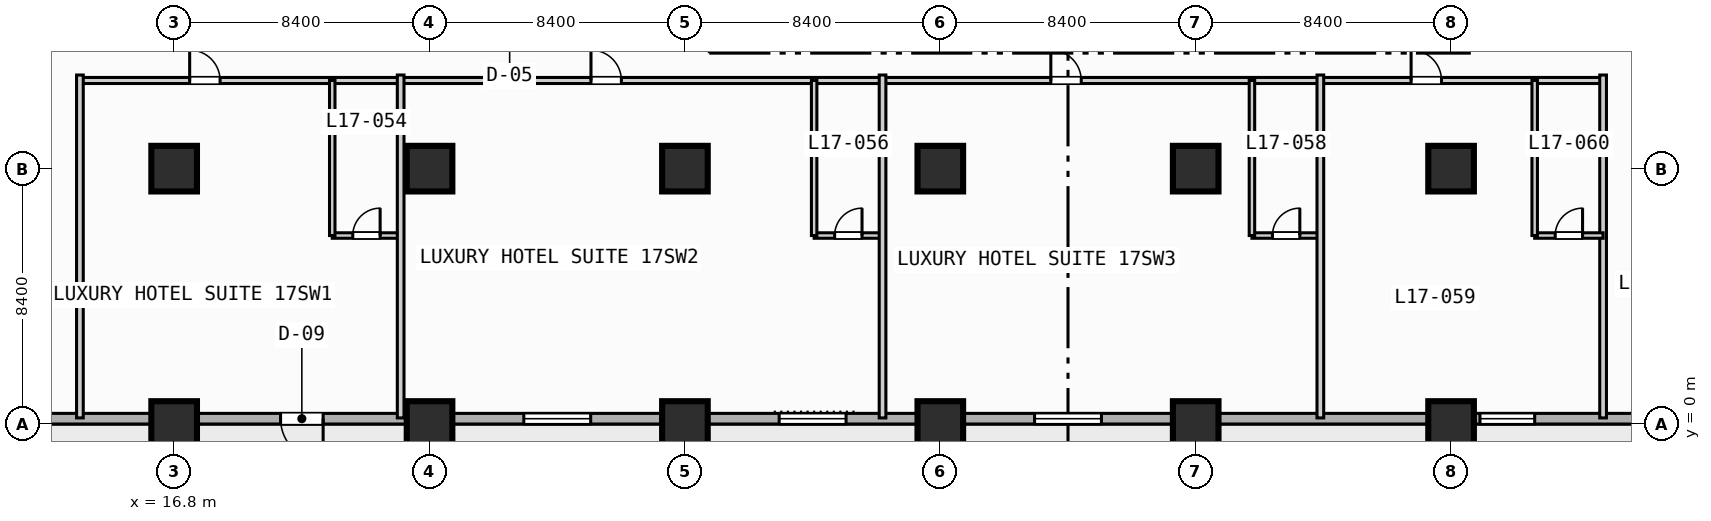
"""IFC4 building model, lengths in metres.
Left out: names, types, materials, properties, quantities, classifications, styles, units other than length and angle.
Written with IfcOpenShell. Run it as: python <this file> out.ifc"""

import sys

from ifc_helpers import new_model, si_unit, direction, frame, frame_2d, origin, origin_2d, place, context, subcontext, project, spatial, rectangle, extrude, element, fill, save


model = new_model("IFC4")
c1 = context("Model", 3, precision=1e-05, world=origin(), true_north=direction((0.0, 1.0)))
c2 = subcontext(c1, "Body", "Model", "MODEL_VIEW")
j1 = project(units=[si_unit("LENGTHUNIT", "METRE"), si_unit("PLANEANGLEUNIT", "RADIAN")], contexts=[c1])
p1 = place(None, origin())
s1 = spatial("IfcSite", under=j1, at=p1, CompositionType="ELEMENT")
p2 = place(p1, origin())
s2 = spatial("IfcBuilding", under=s1, at=p2, CompositionType="ELEMENT")
p3 = place(p2, frame((0.0, 0.0, 73.8)))
s3 = spatial("IfcBuildingStorey", under=s2, at=p3, CompositionType="ELEMENT", Elevation=73.8)
for number, where, z_axis, x_axis in (
    (1, (16.8, 0.0, 0.0), (0.0, 0.0, 1.0), (1.0, 0.0, 0.0)),
    (2, (16.8, 8.4, 0.0), (0.0, 0.0, 1.0), (1.0, 0.0, 0.0)),
    (3, (25.2, 0.0, 0.0), (0.0, 0.0, 1.0), (1.0, 0.0, 0.0)),
    (4, (25.2, 8.4, 0.0), (0.0, 0.0, 1.0), (1.0, 0.0, 0.0)),
    (5, (33.6, 0.0, 0.0), (0.0, 0.0, 1.0), (1.0, 0.0, 0.0)),
    (6, (33.6, 8.4, 0.0), (0.0, 0.0, 1.0), (1.0, 0.0, 0.0)),
    (7, (42.0, 0.0, 0.0), (0.0, 0.0, 1.0), (1.0, 0.0, 0.0)),
    (8, (42.0, 8.4, 0.0), (0.0, 0.0, 1.0), (1.0, 0.0, 0.0)),
    (9, (50.4, 0.0, 0.0), (0.0, 0.0, 1.0), (1.0, 0.0, 0.0)),
    (10, (50.4, 8.4, 0.0), (0.0, 0.0, 1.0), (1.0, 0.0, 0.0)),
    (11, (58.8, 0.0, 0.0), (0.0, 0.0, 1.0), (1.0, 0.0, 0.0)),
    (12, (58.8, 8.4, 0.0), (0.0, 0.0, 1.0), (1.0, 0.0, 0.0)),
):
    element("IfcColumn", number, at=place(p3, frame(where, z_axis=z_axis, x_axis=x_axis)), inside=s3, PredefinedType="COLUMN", context=c2, shape_type="SweptSolid", body=[
        extrude(rectangle(XDim=1.5, YDim=1.5, at=origin_2d()), origin(), (0.0, 0.0, 1.0), 3.8),
    ])
p4 = place(p3, frame((89.225, 0.175, 0.0), z_axis=(0.0, 0.0, 1.0), x_axis=(-1.0, 0.0, 0.0)))
e13 = element("IfcWall", 13, at=p4, inside=s3, PredefinedType="STANDARD", context=c2, shape_type="SweptSolid", body=[
    extrude(rectangle(XDim=86.05, YDim=0.35, at=frame_2d((43.025, 0.0))), origin(), (0.0, 0.0, 1.0), 3.55),
])
p5 = place(p4, frame((67.525, 0.0, 0.0)))
e14 = element("IfcOpeningElement", 14, at=p5, cuts=e13, PredefinedType="OPENING", context=c2, shape_type="SweptSolid", body=[
    extrude(rectangle(XDim=1.4, YDim=2.2, at=frame_2d((0.7, 1.1))), frame((0.0, 0.185, 0.0), z_axis=(0.0, -1.0, 0.0), x_axis=(1.0, 0.0, 0.0)), (0.0, 0.0, 1.0), 0.37),
])
p6 = place(p4, frame((58.725, 0.0, 0.85)))
e15 = element("IfcOpeningElement", 15, at=p6, cuts=e13, PredefinedType="OPENING", context=c2, shape_type="SweptSolid", body=[
    extrude(rectangle(XDim=2.2, YDim=1.8, at=frame_2d((1.1, 0.9))), frame((0.0, 0.185, 0.0), z_axis=(0.0, -1.0, 0.0), x_axis=(1.0, 0.0, 0.0)), (0.0, 0.0, 1.0), 0.37),
])
p7 = place(p4, frame((50.325, 0.0, 0.85)))
e16 = element("IfcOpeningElement", 16, at=p7, cuts=e13, PredefinedType="OPENING", context=c2, shape_type="SweptSolid", body=[
    extrude(rectangle(XDim=2.2, YDim=1.8, at=frame_2d((1.1, 0.9))), frame((0.0, 0.185, 0.0), z_axis=(0.0, -1.0, 0.0), x_axis=(1.0, 0.0, 0.0)), (0.0, 0.0, 1.0), 0.37),
])
p8 = place(p4, frame((41.925, 0.0, 0.85)))
e17 = element("IfcOpeningElement", 17, at=p8, cuts=e13, PredefinedType="OPENING", context=c2, shape_type="SweptSolid", body=[
    extrude(rectangle(XDim=2.2, YDim=1.8, at=frame_2d((1.1, 0.9))), frame((0.0, 0.185, 0.0), z_axis=(0.0, -1.0, 0.0), x_axis=(1.0, 0.0, 0.0)), (0.0, 0.0, 1.0), 0.37),
])
p9 = place(p4, frame((27.675, 0.0, 0.85)))
e18 = element("IfcOpeningElement", 18, at=p9, cuts=e13, PredefinedType="OPENING", context=c2, shape_type="SweptSolid", body=[
    extrude(rectangle(XDim=1.8, YDim=1.8, at=frame_2d((0.9, 0.9))), frame((0.0, 0.185, 0.0), z_axis=(0.0, -1.0, 0.0), x_axis=(1.0, 0.0, 0.0)), (0.0, 0.0, 1.0), 0.37),
])
p10 = place(p3, frame((13.7, 11.3, 0.0), z_axis=(0.0, 0.0, 1.0), x_axis=(1.0, 0.0, 0.0)))
e19 = element("IfcWall", 19, at=p10, inside=s3, PredefinedType="PARTITIONING", context=c2, shape_type="SweptSolid", body=[
    extrude(rectangle(XDim=50.1, YDim=0.2, at=frame_2d((25.05, 0.0))), origin(), (0.0, 0.0, 1.0), 3.55),
])
p11 = place(p10, frame((3.61, 0.0, 0.0)))
e20 = element("IfcOpeningElement", 20, at=p11, cuts=e19, PredefinedType="OPENING", context=c2, shape_type="SweptSolid", body=[
    extrude(rectangle(XDim=1.0, YDim=2.15, at=frame_2d((0.5, 1.075))), frame((0.0, 0.11, 0.0), z_axis=(0.0, -1.0, 0.0), x_axis=(1.0, 0.0, 0.0)), (0.0, 0.0, 1.0), 0.22),
])
p12 = place(p10, frame((16.81, 0.0, 0.0)))
e21 = element("IfcOpeningElement", 21, at=p12, cuts=e19, PredefinedType="OPENING", context=c2, shape_type="SweptSolid", body=[
    extrude(rectangle(XDim=1.0, YDim=2.15, at=frame_2d((0.5, 1.075))), frame((0.0, 0.11, 0.0), z_axis=(0.0, -1.0, 0.0), x_axis=(1.0, 0.0, 0.0)), (0.0, 0.0, 1.0), 0.22),
])
p13 = place(p10, frame((31.935, 0.0, 0.0)))
e22 = element("IfcOpeningElement", 22, at=p13, cuts=e19, PredefinedType="OPENING", context=c2, shape_type="SweptSolid", body=[
    extrude(rectangle(XDim=1.0, YDim=2.15, at=frame_2d((0.5, 1.075))), frame((0.0, 0.11, 0.0), z_axis=(0.0, -1.0, 0.0), x_axis=(1.0, 0.0, 0.0)), (0.0, 0.0, 1.0), 0.22),
])
p14 = place(p10, frame((43.785, 0.0, 0.0)))
e23 = element("IfcOpeningElement", 23, at=p14, cuts=e19, PredefinedType="OPENING", context=c2, shape_type="SweptSolid", body=[
    extrude(rectangle(XDim=1.0, YDim=2.15, at=frame_2d((0.5, 1.075))), frame((0.0, 0.11, 0.0), z_axis=(0.0, -1.0, 0.0), x_axis=(1.0, 0.0, 0.0)), (0.0, 0.0, 1.0), 0.22),
])
p15 = place(p3, frame((13.7, 0.2, 0.0), z_axis=(0.0, 0.0, 1.0), x_axis=(0.0, 1.0, 0.0)))
e24 = element("IfcWall", 24, at=p15, inside=s3, PredefinedType="PARTITIONING", context=c2, shape_type="SweptSolid", body=[
    extrude(rectangle(XDim=11.28, YDim=0.22, at=frame_2d((5.64, 0.0))), origin(), (0.0, 0.0, 1.0), 3.55),
])
p16 = place(p3, frame((22.0, 6.2, 0.0), z_axis=(0.0, 0.0, 1.0), x_axis=(1.0, 0.0, 0.0)))
e25 = element("IfcWall", 25, at=p16, inside=s3, PredefinedType="PLUMBINGWALL", context=c2, shape_type="SweptSolid", body=[
    extrude(rectangle(XDim=2.25, YDim=0.18, at=frame_2d((1.125, 0.0))), origin(), (0.0, 0.0, 1.0), 3.55),
])
p17 = place(p16, frame((0.675, 0.0, 0.0)))
e26 = element("IfcOpeningElement", 26, at=p17, cuts=e25, PredefinedType="OPENING", context=c2, shape_type="SweptSolid", body=[
    extrude(rectangle(XDim=0.9, YDim=2.1, at=frame_2d((0.45, 1.05))), frame((0.0, 0.1, 0.0), z_axis=(0.0, -1.0, 0.0), x_axis=(1.0, 0.0, 0.0)), (0.0, 0.0, 1.0), 0.2),
])
p18 = place(p3, frame((22.0, 6.2, 0.0), z_axis=(0.0, 0.0, 1.0), x_axis=(0.0, 1.0, 0.0)))
e27 = element("IfcWall", 27, at=p18, inside=s3, PredefinedType="PLUMBINGWALL", context=c2, shape_type="SweptSolid", body=[
    extrude(rectangle(XDim=5.1, YDim=0.18, at=frame_2d((2.55, 0.0))), origin(), (0.0, 0.0, 1.0), 3.55),
])
p19 = place(p3, frame((24.25, 0.2, 0.0), z_axis=(0.0, 0.0, 1.0), x_axis=(0.0, 1.0, 0.0)))
e28 = element("IfcWall", 28, at=p19, inside=s3, PredefinedType="PARTITIONING", context=c2, shape_type="SweptSolid", body=[
    extrude(rectangle(XDim=11.28, YDim=0.22, at=frame_2d((5.64, 0.0))), origin(), (0.0, 0.0, 1.0), 3.55),
])
p20 = place(p3, frame((37.85, 6.2, 0.0), z_axis=(0.0, 0.0, 1.0), x_axis=(1.0, 0.0, 0.0)))
e29 = element("IfcWall", 29, at=p20, inside=s3, PredefinedType="PLUMBINGWALL", context=c2, shape_type="SweptSolid", body=[
    extrude(rectangle(XDim=2.25, YDim=0.18, at=frame_2d((1.125, 0.0))), origin(), (0.0, 0.0, 1.0), 3.55),
])
p21 = place(p20, frame((0.675, 0.0, 0.0)))
e30 = element("IfcOpeningElement", 30, at=p21, cuts=e29, PredefinedType="OPENING", context=c2, shape_type="SweptSolid", body=[
    extrude(rectangle(XDim=0.9, YDim=2.1, at=frame_2d((0.45, 1.05))), frame((0.0, 0.1, 0.0), z_axis=(0.0, -1.0, 0.0), x_axis=(1.0, 0.0, 0.0)), (0.0, 0.0, 1.0), 0.2),
])
p22 = place(p3, frame((37.85, 6.2, 0.0), z_axis=(0.0, 0.0, 1.0), x_axis=(0.0, 1.0, 0.0)))
e31 = element("IfcWall", 31, at=p22, inside=s3, PredefinedType="PLUMBINGWALL", context=c2, shape_type="SweptSolid", body=[
    extrude(rectangle(XDim=5.1, YDim=0.18, at=frame_2d((2.55, 0.0))), origin(), (0.0, 0.0, 1.0), 3.55),
])
p23 = place(p3, frame((40.1, 0.2, 0.0), z_axis=(0.0, 0.0, 1.0), x_axis=(0.0, 1.0, 0.0)))
e32 = element("IfcWall", 32, at=p23, inside=s3, PredefinedType="PARTITIONING", context=c2, shape_type="SweptSolid", body=[
    extrude(rectangle(XDim=11.28, YDim=0.22, at=frame_2d((5.64, 0.0))), origin(), (0.0, 0.0, 1.0), 3.55),
])
p24 = place(p3, frame((52.25, 6.2, 0.0), z_axis=(0.0, 0.0, 1.0), x_axis=(1.0, 0.0, 0.0)))
e33 = element("IfcWall", 33, at=p24, inside=s3, PredefinedType="PLUMBINGWALL", context=c2, shape_type="SweptSolid", body=[
    extrude(rectangle(XDim=2.25, YDim=0.18, at=frame_2d((1.125, 0.0))), origin(), (0.0, 0.0, 1.0), 3.55),
])
p25 = place(p24, frame((0.675, 0.0, 0.0)))
e34 = element("IfcOpeningElement", 34, at=p25, cuts=e33, PredefinedType="OPENING", context=c2, shape_type="SweptSolid", body=[
    extrude(rectangle(XDim=0.9, YDim=2.1, at=frame_2d((0.45, 1.05))), frame((0.0, 0.1, 0.0), z_axis=(0.0, -1.0, 0.0), x_axis=(1.0, 0.0, 0.0)), (0.0, 0.0, 1.0), 0.2),
])
p26 = place(p3, frame((52.25, 6.2, 0.0), z_axis=(0.0, 0.0, 1.0), x_axis=(0.0, 1.0, 0.0)))
e35 = element("IfcWall", 35, at=p26, inside=s3, PredefinedType="PLUMBINGWALL", context=c2, shape_type="SweptSolid", body=[
    extrude(rectangle(XDim=5.1, YDim=0.18, at=frame_2d((2.55, 0.0))), origin(), (0.0, 0.0, 1.0), 3.55),
])
for number, where, z_axis, x_axis in (
    (36, (54.5, 0.2, 0.0), (0.0, 0.0, 1.0), (0.0, 1.0, 0.0)),
    (37, (63.8, 0.2, 0.0), (0.0, 0.0, 1.0), (0.0, 1.0, 0.0)),
):
    element("IfcWall", number, at=place(p3, frame(where, z_axis=z_axis, x_axis=x_axis)), inside=s3, PredefinedType="PARTITIONING", context=c2, shape_type="SweptSolid", body=[
        extrude(rectangle(XDim=11.28, YDim=0.22, at=frame_2d((5.64, 0.0))), origin(), (0.0, 0.0, 1.0), 3.55),
    ])
p27 = place(p3, frame((61.55, 6.2, 0.0), z_axis=(0.0, 0.0, 1.0), x_axis=(1.0, 0.0, 0.0)))
e38 = element("IfcWall", 38, at=p27, inside=s3, PredefinedType="PLUMBINGWALL", context=c2, shape_type="SweptSolid", body=[
    extrude(rectangle(XDim=2.25, YDim=0.18, at=frame_2d((1.125, 0.0))), origin(), (0.0, 0.0, 1.0), 3.55),
])
p28 = place(p27, frame((0.675, 0.0, 0.0)))
e39 = element("IfcOpeningElement", 39, at=p28, cuts=e38, PredefinedType="OPENING", context=c2, shape_type="SweptSolid", body=[
    extrude(rectangle(XDim=0.9, YDim=2.1, at=frame_2d((0.45, 1.05))), frame((0.0, 0.1, 0.0), z_axis=(0.0, -1.0, 0.0), x_axis=(1.0, 0.0, 0.0)), (0.0, 0.0, 1.0), 0.2),
])
p29 = place(p3, frame((61.55, 6.2, 0.0), z_axis=(0.0, 0.0, 1.0), x_axis=(0.0, 1.0, 0.0)))
e40 = element("IfcWall", 40, at=p29, inside=s3, PredefinedType="PLUMBINGWALL", context=c2, shape_type="SweptSolid", body=[
    extrude(rectangle(XDim=5.1, YDim=0.18, at=frame_2d((2.55, 0.0))), origin(), (0.0, 0.0, 1.0), 3.55),
])
p30 = place(p5, origin())
e41 = element("IfcDoor", 41, at=p30, inside=s3, OperationType="SINGLE_SWING_LEFT", PredefinedType="DOOR", context=c2, shape_type="SweptSolid", body=[
    extrude(rectangle(XDim=1.4, YDim=2.2, at=frame_2d((0.7, 1.1))), frame((0.0, 0.025, 0.0), z_axis=(0.0, -1.0, 0.0), x_axis=(1.0, 0.0, 0.0)), (0.0, 0.0, 1.0), 0.05),
])
fill(e14, e41)
p31 = place(p6, origin())
e42 = element("IfcWindow", 42, at=p31, inside=s3, PartitioningType="SINGLE_PANEL", PredefinedType="WINDOW", context=c2, shape_type="SweptSolid", body=[
    extrude(rectangle(XDim=2.2, YDim=1.8, at=frame_2d((1.1, 0.9))), frame((0.0, 0.03, 0.0), z_axis=(0.0, -1.0, 0.0), x_axis=(1.0, 0.0, 0.0)), (0.0, 0.0, 1.0), 0.06),
])
fill(e15, e42)
p32 = place(p7, origin())
e43 = element("IfcWindow", 43, at=p32, inside=s3, PartitioningType="SINGLE_PANEL", PredefinedType="WINDOW", context=c2, shape_type="SweptSolid", body=[
    extrude(rectangle(XDim=2.2, YDim=1.8, at=frame_2d((1.1, 0.9))), frame((0.0, 0.03, 0.0), z_axis=(0.0, -1.0, 0.0), x_axis=(1.0, 0.0, 0.0)), (0.0, 0.0, 1.0), 0.06),
])
fill(e16, e43)
p33 = place(p8, origin())
e44 = element("IfcWindow", 44, at=p33, inside=s3, PartitioningType="SINGLE_PANEL", PredefinedType="WINDOW", context=c2, shape_type="SweptSolid", body=[
    extrude(rectangle(XDim=2.2, YDim=1.8, at=frame_2d((1.1, 0.9))), frame((0.0, 0.03, 0.0), z_axis=(0.0, -1.0, 0.0), x_axis=(1.0, 0.0, 0.0)), (0.0, 0.0, 1.0), 0.06),
])
fill(e17, e44)
p34 = place(p9, origin())
e45 = element("IfcWindow", 45, at=p34, inside=s3, PartitioningType="SINGLE_PANEL", PredefinedType="WINDOW", context=c2, shape_type="SweptSolid", body=[
    extrude(rectangle(XDim=1.8, YDim=1.8, at=frame_2d((0.9, 0.9))), frame((0.0, 0.03, 0.0), z_axis=(0.0, -1.0, 0.0), x_axis=(1.0, 0.0, 0.0)), (0.0, 0.0, 1.0), 0.06),
])
fill(e18, e45)
p35 = place(p11, origin())
e46 = element("IfcDoor", 46, at=p35, inside=s3, OperationType="SINGLE_SWING_LEFT", PredefinedType="DOOR", context=c2, shape_type="SweptSolid", body=[
    extrude(rectangle(XDim=1.0, YDim=2.15, at=frame_2d((0.5, 1.075))), frame((0.0, 0.025, 0.0), z_axis=(0.0, -1.0, 0.0), x_axis=(1.0, 0.0, 0.0)), (0.0, 0.0, 1.0), 0.05),
])
fill(e20, e46)
p36 = place(p12, origin())
e47 = element("IfcDoor", 47, at=p36, inside=s3, OperationType="SINGLE_SWING_LEFT", PredefinedType="DOOR", context=c2, shape_type="SweptSolid", body=[
    extrude(rectangle(XDim=1.0, YDim=2.15, at=frame_2d((0.5, 1.075))), frame((0.0, 0.025, 0.0), z_axis=(0.0, -1.0, 0.0), x_axis=(1.0, 0.0, 0.0)), (0.0, 0.0, 1.0), 0.05),
])
fill(e21, e47)
p37 = place(p13, origin())
e48 = element("IfcDoor", 48, at=p37, inside=s3, OperationType="SINGLE_SWING_LEFT", PredefinedType="DOOR", context=c2, shape_type="SweptSolid", body=[
    extrude(rectangle(XDim=1.0, YDim=2.15, at=frame_2d((0.5, 1.075))), frame((0.0, 0.025, 0.0), z_axis=(0.0, -1.0, 0.0), x_axis=(1.0, 0.0, 0.0)), (0.0, 0.0, 1.0), 0.05),
])
fill(e22, e48)
p38 = place(p14, origin())
e49 = element("IfcDoor", 49, at=p38, inside=s3, OperationType="SINGLE_SWING_LEFT", PredefinedType="DOOR", context=c2, shape_type="SweptSolid", body=[
    extrude(rectangle(XDim=1.0, YDim=2.15, at=frame_2d((0.5, 1.075))), frame((0.0, 0.025, 0.0), z_axis=(0.0, -1.0, 0.0), x_axis=(1.0, 0.0, 0.0)), (0.0, 0.0, 1.0), 0.05),
])
fill(e23, e49)
p39 = place(p17, origin())
e50 = element("IfcDoor", 50, at=p39, inside=s3, OperationType="SINGLE_SWING_RIGHT", PredefinedType="DOOR", context=c2, shape_type="SweptSolid", body=[
    extrude(rectangle(XDim=0.9, YDim=2.1, at=frame_2d((0.45, 1.05))), frame((0.0, 0.025, 0.0), z_axis=(0.0, -1.0, 0.0), x_axis=(1.0, 0.0, 0.0)), (0.0, 0.0, 1.0), 0.05),
])
fill(e26, e50)
p40 = place(p21, origin())
e51 = element("IfcDoor", 51, at=p40, inside=s3, OperationType="SINGLE_SWING_RIGHT", PredefinedType="DOOR", context=c2, shape_type="SweptSolid", body=[
    extrude(rectangle(XDim=0.9, YDim=2.1, at=frame_2d((0.45, 1.05))), frame((0.0, 0.025, 0.0), z_axis=(0.0, -1.0, 0.0), x_axis=(1.0, 0.0, 0.0)), (0.0, 0.0, 1.0), 0.05),
])
fill(e30, e51)
p41 = place(p25, origin())
e52 = element("IfcDoor", 52, at=p41, inside=s3, OperationType="SINGLE_SWING_RIGHT", PredefinedType="DOOR", context=c2, shape_type="SweptSolid", body=[
    extrude(rectangle(XDim=0.9, YDim=2.1, at=frame_2d((0.45, 1.05))), frame((0.0, 0.025, 0.0), z_axis=(0.0, -1.0, 0.0), x_axis=(1.0, 0.0, 0.0)), (0.0, 0.0, 1.0), 0.05),
])
fill(e34, e52)
p42 = place(p28, origin())
e53 = element("IfcDoor", 53, at=p42, inside=s3, OperationType="SINGLE_SWING_RIGHT", PredefinedType="DOOR", context=c2, shape_type="SweptSolid", body=[
    extrude(rectangle(XDim=0.9, YDim=2.1, at=frame_2d((0.45, 1.05))), frame((0.0, 0.025, 0.0), z_axis=(0.0, -1.0, 0.0), x_axis=(1.0, 0.0, 0.0)), (0.0, 0.0, 1.0), 0.05),
])
fill(e39, e53)
save(model, sys.argv[1])
